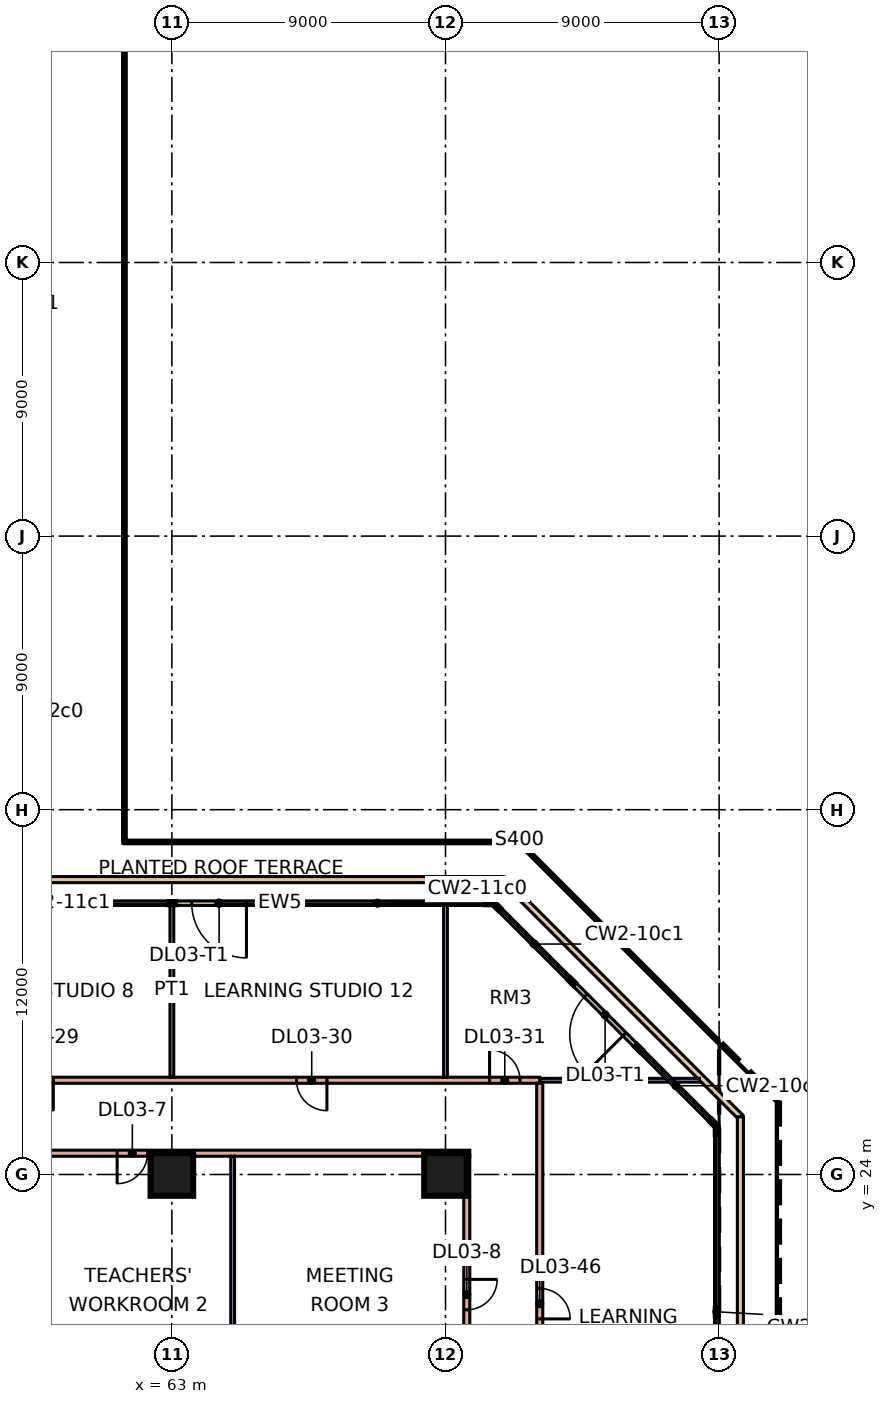
"""IFC4 building model, lengths in metres.
Left out: names, types, materials, properties, quantities, classifications, styles, units other than length and angle.
Written with IfcOpenShell. Run it as: python <this file> out.ifc"""

import sys

from ifc_helpers import new_model, si_unit, direction, frame, frame_2d, origin, origin_2d, place, context, subcontext, project, spatial, rectangle, extrude, element, fill, save


model = new_model("IFC4")
c1 = context("Model", 3, precision=1e-05, world=origin(), true_north=direction((0.0, 1.0)))
c2 = subcontext(c1, "Body", "Model", "MODEL_VIEW")
j1 = project(units=[si_unit("LENGTHUNIT", "METRE"), si_unit("PLANEANGLEUNIT", "RADIAN")], contexts=[c1])
p1 = place(None, origin())
s1 = spatial("IfcSite", under=j1, at=p1, CompositionType="ELEMENT")
p2 = place(p1, origin())
s2 = spatial("IfcBuilding", under=s1, at=p2, CompositionType="ELEMENT")
p3 = place(p2, frame((0.0, 0.0, 16.8)))
s3 = spatial("IfcBuildingStorey", under=s2, at=p3, CompositionType="ELEMENT", Elevation=16.8)
for number, where, z_axis, x_axis in (
    (1, (63.0, 24.0, 0.0), (0.0, 0.0, 1.0), (1.0, 0.0, 0.0)),
    (2, (72.0, 24.0, 0.0), (0.0, 0.0, 1.0), (1.0, 0.0, 0.0)),
):
    element("IfcColumn", number, at=place(p3, frame(where, z_axis=z_axis, x_axis=x_axis)), inside=s3, PredefinedType="COLUMN", context=c2, shape_type="SweptSolid", body=[
        extrude(rectangle(XDim=1.4, YDim=1.4, at=origin_2d()), origin(), (0.0, 0.0, 1.0), 4.8),
    ])
p4 = place(p3, frame((78.311, 28.19, 0.0), z_axis=(0.0, 0.0, 1.0), x_axis=(-0.707106781187, 0.707106781187, 0.0)))
e3 = element("IfcWall", 3, at=p4, inside=s3, PredefinedType="SOLIDWALL", context=c2, shape_type="SweptSolid", body=[
    extrude(rectangle(XDim=3.0, YDim=0.15, at=frame_2d((1.5, 0.0))), origin(), (0.0, 0.0, 1.0), 4.4),
])
p5 = place(p4, frame((0.6, 0.0, 0.0)))
e4 = element("IfcOpeningElement", 4, at=p5, cuts=e3, PredefinedType="OPENING", context=c2, shape_type="SweptSolid", body=[
    extrude(rectangle(XDim=1.8, YDim=2.4, at=frame_2d((0.9, 1.2))), frame((0.0, 0.085, 0.0), z_axis=(0.0, -1.0, 0.0), x_axis=(1.0, 0.0, 0.0)), (0.0, 0.0, 1.0), 0.17),
])
p6 = place(p3, frame((66.053, 32.925, 0.0), z_axis=(0.0, 0.0, 1.0), x_axis=(-1.0, 0.0, 0.0)))
e5 = element("IfcWall", 5, at=p6, inside=s3, PredefinedType="SOLIDWALL", context=c2, shape_type="SweptSolid", body=[
    extrude(rectangle(XDim=3.0, YDim=0.15, at=frame_2d((1.5, 0.0))), origin(), (0.0, 0.0, 1.0), 4.4),
])
p7 = place(p6, frame((0.6, 0.0, 0.0)))
e6 = element("IfcOpeningElement", 6, at=p7, cuts=e5, PredefinedType="OPENING", context=c2, shape_type="SweptSolid", body=[
    extrude(rectangle(XDim=1.8, YDim=2.4, at=frame_2d((0.9, 1.2))), frame((0.0, 0.085, 0.0), z_axis=(0.0, -1.0, 0.0), x_axis=(1.0, 0.0, 0.0)), (0.0, 0.0, 1.0), 0.17),
])
p8 = place(p3, frame((56.2, 33.7, 0.0), z_axis=(0.0, 0.0, 1.0), x_axis=(1.0, 0.0, 0.0)))
e7 = element("IfcWall", 7, at=p8, inside=s3, PredefinedType="PARAPET", context=c2, shape_type="SweptSolid", body=[
    extrude(rectangle(XDim=17.697, YDim=0.2, at=frame_2d((8.848, 0.0))), origin(), (0.0, 0.0, 1.0), 0.5),
])
p9 = place(p3, frame((73.896, 33.7, 0.0), z_axis=(0.0, 0.0, 1.0), x_axis=(0.707106781187, -0.707106781187, 0.0)))
e8 = element("IfcWall", 8, at=p9, inside=s3, PredefinedType="PARAPET", context=c2, shape_type="SweptSolid", body=[
    extrude(rectangle(XDim=11.036, YDim=0.2, at=frame_2d((5.518, 0.0))), origin(), (0.0, 0.0, 1.0), 0.5),
])
p10 = place(p3, frame((81.7, 25.896, 0.0), z_axis=(0.0, 0.0, 1.0), x_axis=(0.0, -1.0, 0.0)))
e9 = element("IfcWall", 9, at=p10, inside=s3, PredefinedType="PARAPET", context=c2, shape_type="SweptSolid", body=[
    extrude(rectangle(XDim=27.793, YDim=0.2, at=frame_2d((13.896, 0.0))), origin(), (0.0, 0.0, 1.0), 0.5),
])
p11 = place(p3, frame((38.3, 27.1, 0.0), z_axis=(0.0, 0.0, 1.0), x_axis=(1.0, 0.0, 0.0)))
e10 = element("IfcWall", 10, at=p11, inside=s3, PredefinedType="PARTITIONING", context=c2, shape_type="SweptSolid", body=[
    extrude(rectangle(XDim=36.8, YDim=0.2, at=frame_2d((18.4, 0.0))), origin(), (0.0, 0.0, 1.0), 4.4),
])
p12 = place(p11, frame((10.8, 0.0, 0.0)))
e11 = element("IfcOpeningElement", 11, at=p12, cuts=e10, PredefinedType="OPENING", context=c2, shape_type="SweptSolid", body=[
    extrude(rectangle(XDim=1.0, YDim=2.1, at=frame_2d((0.5, 1.05))), frame((0.0, 0.11, 0.0), z_axis=(0.0, -1.0, 0.0), x_axis=(1.0, 0.0, 0.0)), (0.0, 0.0, 1.0), 0.22),
])
p13 = place(p11, frame((19.8, 0.0, 0.0)))
e12 = element("IfcOpeningElement", 12, at=p13, cuts=e10, PredefinedType="OPENING", context=c2, shape_type="SweptSolid", body=[
    extrude(rectangle(XDim=1.0, YDim=2.1, at=frame_2d((0.5, 1.05))), frame((0.0, 0.11, 0.0), z_axis=(0.0, -1.0, 0.0), x_axis=(1.0, 0.0, 0.0)), (0.0, 0.0, 1.0), 0.22),
])
p14 = place(p11, frame((28.8, 0.0, 0.0)))
e13 = element("IfcOpeningElement", 13, at=p14, cuts=e10, PredefinedType="OPENING", context=c2, shape_type="SweptSolid", body=[
    extrude(rectangle(XDim=1.0, YDim=2.1, at=frame_2d((0.5, 1.05))), frame((0.0, 0.11, 0.0), z_axis=(0.0, -1.0, 0.0), x_axis=(1.0, 0.0, 0.0)), (0.0, 0.0, 1.0), 0.22),
])
p15 = place(p11, frame((35.15, 0.0, 0.0)))
e14 = element("IfcOpeningElement", 14, at=p15, cuts=e10, PredefinedType="OPENING", context=c2, shape_type="SweptSolid", body=[
    extrude(rectangle(XDim=1.0, YDim=2.1, at=frame_2d((0.5, 1.05))), frame((0.0, 0.11, 0.0), z_axis=(0.0, -1.0, 0.0), x_axis=(1.0, 0.0, 0.0)), (0.0, 0.0, 1.0), 0.22),
])
p16 = place(p3, frame((40.2, 24.7, 0.0), z_axis=(0.0, 0.0, 1.0), x_axis=(1.0, 0.0, 0.0)))
e15 = element("IfcWall", 15, at=p16, inside=s3, PredefinedType="PARTITIONING", context=c2, shape_type="SweptSolid", body=[
    extrude(rectangle(XDim=32.6, YDim=0.2, at=frame_2d((16.3, 0.0))), origin(), (0.0, 0.0, 1.0), 4.4),
])
p17 = place(p16, frame((2.65, 0.0, 0.0)))
e16 = element("IfcOpeningElement", 16, at=p17, cuts=e15, PredefinedType="OPENING", context=c2, shape_type="SweptSolid", body=[
    extrude(rectangle(XDim=1.0, YDim=2.1, at=frame_2d((0.5, 1.05))), frame((0.0, 0.11, 0.0), z_axis=(0.0, -1.0, 0.0), x_axis=(1.0, 0.0, 0.0)), (0.0, 0.0, 1.0), 0.22),
])
p18 = place(p16, frame((8.85, 0.0, 0.0)))
e17 = element("IfcOpeningElement", 17, at=p18, cuts=e15, PredefinedType="OPENING", context=c2, shape_type="SweptSolid", body=[
    extrude(rectangle(XDim=1.0, YDim=2.1, at=frame_2d((0.5, 1.05))), frame((0.0, 0.11, 0.0), z_axis=(0.0, -1.0, 0.0), x_axis=(1.0, 0.0, 0.0)), (0.0, 0.0, 1.0), 0.22),
])
p19 = place(p16, frame((15.05, 0.0, 0.0)))
e18 = element("IfcOpeningElement", 18, at=p19, cuts=e15, PredefinedType="OPENING", context=c2, shape_type="SweptSolid", body=[
    extrude(rectangle(XDim=1.0, YDim=2.1, at=frame_2d((0.5, 1.05))), frame((0.0, 0.11, 0.0), z_axis=(0.0, -1.0, 0.0), x_axis=(1.0, 0.0, 0.0)), (0.0, 0.0, 1.0), 0.22),
])
p20 = place(p16, frame((21.0, 0.0, 0.0)))
e19 = element("IfcOpeningElement", 19, at=p20, cuts=e15, PredefinedType="OPENING", context=c2, shape_type="SweptSolid", body=[
    extrude(rectangle(XDim=1.0, YDim=2.1, at=frame_2d((0.5, 1.05))), frame((0.0, 0.11, 0.0), z_axis=(0.0, -1.0, 0.0), x_axis=(1.0, 0.0, 0.0)), (0.0, 0.0, 1.0), 0.22),
])
p21 = place(p3, frame((63.0, 27.2, 0.0), z_axis=(0.0, 0.0, 1.0), x_axis=(0.0, 1.0, 0.0)))
e20 = element("IfcWall", 20, at=p21, inside=s3, PredefinedType="PARTITIONING", context=c2, shape_type="SweptSolid", body=[
    extrude(rectangle(XDim=5.725, YDim=0.125, at=frame_2d((2.863, 0.0))), origin(), (0.0, 0.0, 1.0), 4.4),
])
p22 = place(p3, frame((65.0, 15.7, 0.0), z_axis=(0.0, 0.0, 1.0), x_axis=(0.0, 1.0, 0.0)))
e21 = element("IfcWall", 21, at=p22, inside=s3, PredefinedType="PARTITIONING", context=c2, shape_type="SweptSolid", body=[
    extrude(rectangle(XDim=8.9, YDim=0.125, at=frame_2d((4.45, 0.0))), origin(), (0.0, 0.0, 1.0), 4.4),
])
p23 = place(p3, frame((72.0, 27.2, 0.0), z_axis=(0.0, 0.0, 1.0), x_axis=(0.0, 1.0, 0.0)))
e22 = element("IfcWall", 22, at=p23, inside=s3, PredefinedType="PARTITIONING", context=c2, shape_type="SweptSolid", body=[
    extrude(rectangle(XDim=6.4, YDim=0.125, at=frame_2d((3.2, 0.0))), origin(), (0.0, 0.0, 1.0), 4.4),
])
p24 = place(p3, frame((72.7, 15.7, 0.0), z_axis=(0.0, 0.0, 1.0), x_axis=(0.0, 1.0, 0.0)))
e23 = element("IfcWall", 23, at=p24, inside=s3, PredefinedType="PARTITIONING", context=c2, shape_type="SweptSolid", body=[
    extrude(rectangle(XDim=8.9, YDim=0.2, at=frame_2d((4.45, 0.0))), origin(), (0.0, 0.0, 1.0), 4.4),
])
p25 = place(p24, frame((3.85, 0.0, 0.0)))
e24 = element("IfcOpeningElement", 24, at=p25, cuts=e23, PredefinedType="OPENING", context=c2, shape_type="SweptSolid", body=[
    extrude(rectangle(XDim=1.0, YDim=2.1, at=frame_2d((0.5, 1.05))), frame((0.0, 0.11, 0.0), z_axis=(0.0, -1.0, 0.0), x_axis=(1.0, 0.0, 0.0)), (0.0, 0.0, 1.0), 0.22),
])
p26 = place(p3, frame((75.1, -3.0, 0.0), z_axis=(0.0, 0.0, 1.0), x_axis=(0.0, 1.0, 0.0)))
e25 = element("IfcWall", 25, at=p26, inside=s3, PredefinedType="PARTITIONING", context=c2, shape_type="SweptSolid", body=[
    extrude(rectangle(XDim=30.0, YDim=0.2, at=frame_2d((15.0, 0.0))), origin(), (0.0, 0.0, 1.0), 4.4),
])
p27 = place(p26, frame((8.4, 0.0, 0.0)))
e26 = element("IfcOpeningElement", 26, at=p27, cuts=e25, PredefinedType="OPENING", context=c2, shape_type="SweptSolid", body=[
    extrude(rectangle(XDim=1.0, YDim=2.1, at=frame_2d((0.5, 1.05))), frame((0.0, 0.11, 0.0), z_axis=(0.0, -1.0, 0.0), x_axis=(1.0, 0.0, 0.0)), (0.0, 0.0, 1.0), 0.22),
])
p28 = place(p26, frame((22.25, 0.0, 0.0)))
e27 = element("IfcOpeningElement", 27, at=p28, cuts=e25, PredefinedType="OPENING", context=c2, shape_type="SweptSolid", body=[
    extrude(rectangle(XDim=1.0, YDim=2.1, at=frame_2d((0.5, 1.05))), frame((0.0, 0.11, 0.0), z_axis=(0.0, -1.0, 0.0), x_axis=(1.0, 0.0, 0.0)), (0.0, 0.0, 1.0), 0.22),
])
p29 = place(p3, frame((75.1, 27.1, 0.0), z_axis=(0.0, 0.0, 1.0), x_axis=(1.0, 0.0, 0.0)))
e28 = element("IfcWall", 28, at=p29, inside=s3, PredefinedType="PARTITIONING", context=c2, shape_type="SweptSolid", body=[
    extrude(rectangle(XDim=5.255, YDim=0.125, at=frame_2d((2.627, 0.0))), origin(), (0.0, 0.0, 1.0), 4.4),
])
p30 = place(p5, origin())
e29 = element("IfcDoor", 29, at=p30, inside=s3, OperationType="DOUBLE_DOOR_SINGLE_SWING", PredefinedType="DOOR", context=c2, shape_type="SweptSolid", body=[
    extrude(rectangle(XDim=1.8, YDim=2.4, at=frame_2d((0.9, 1.2))), frame((0.0, 0.025, 0.0), z_axis=(0.0, -1.0, 0.0), x_axis=(1.0, 0.0, 0.0)), (0.0, 0.0, 1.0), 0.05),
])
fill(e4, e29)
p31 = place(p7, origin())
e30 = element("IfcDoor", 30, at=p31, inside=s3, OperationType="DOUBLE_DOOR_SINGLE_SWING", PredefinedType="DOOR", context=c2, shape_type="SweptSolid", body=[
    extrude(rectangle(XDim=1.8, YDim=2.4, at=frame_2d((0.9, 1.2))), frame((0.0, 0.025, 0.0), z_axis=(0.0, -1.0, 0.0), x_axis=(1.0, 0.0, 0.0)), (0.0, 0.0, 1.0), 0.05),
])
fill(e6, e30)
p32 = place(p20, frame((1.0, 0.0, 0.0), z_axis=(0.0, 0.0, 1.0), x_axis=(-1.0, 0.0, 0.0)))
e31 = element("IfcDoor", 31, at=p32, inside=s3, OperationType="SINGLE_SWING_LEFT", PredefinedType="DOOR", context=c2, shape_type="SweptSolid", body=[
    extrude(rectangle(XDim=1.0, YDim=2.1, at=frame_2d((0.5, 1.05))), frame((0.0, 0.025, 0.0), z_axis=(0.0, -1.0, 0.0), x_axis=(1.0, 0.0, 0.0)), (0.0, 0.0, 1.0), 0.05),
])
fill(e19, e31)
p33 = place(p25, origin())
e32 = element("IfcDoor", 32, at=p33, inside=s3, OperationType="SINGLE_SWING_RIGHT", PredefinedType="DOOR", context=c2, shape_type="SweptSolid", body=[
    extrude(rectangle(XDim=1.0, YDim=2.1, at=frame_2d((0.5, 1.05))), frame((0.0, 0.025, 0.0), z_axis=(0.0, -1.0, 0.0), x_axis=(1.0, 0.0, 0.0)), (0.0, 0.0, 1.0), 0.05),
])
fill(e24, e32)
p34 = place(p13, origin())
e33 = element("IfcDoor", 33, at=p34, inside=s3, OperationType="SINGLE_SWING_RIGHT", PredefinedType="DOOR", context=c2, shape_type="SweptSolid", body=[
    extrude(rectangle(XDim=1.0, YDim=2.1, at=frame_2d((0.5, 1.05))), frame((0.0, 0.025, 0.0), z_axis=(0.0, -1.0, 0.0), x_axis=(1.0, 0.0, 0.0)), (0.0, 0.0, 1.0), 0.05),
])
fill(e12, e33)
p35 = place(p14, origin())
e34 = element("IfcDoor", 34, at=p35, inside=s3, OperationType="SINGLE_SWING_RIGHT", PredefinedType="DOOR", context=c2, shape_type="SweptSolid", body=[
    extrude(rectangle(XDim=1.0, YDim=2.1, at=frame_2d((0.5, 1.05))), frame((0.0, 0.025, 0.0), z_axis=(0.0, -1.0, 0.0), x_axis=(1.0, 0.0, 0.0)), (0.0, 0.0, 1.0), 0.05),
])
fill(e13, e34)
p36 = place(p15, origin())
e35 = element("IfcDoor", 35, at=p36, inside=s3, OperationType="SINGLE_SWING_LEFT", PredefinedType="DOOR", context=c2, shape_type="SweptSolid", body=[
    extrude(rectangle(XDim=1.0, YDim=2.1, at=frame_2d((0.5, 1.05))), frame((0.0, 0.025, 0.0), z_axis=(0.0, -1.0, 0.0), x_axis=(1.0, 0.0, 0.0)), (0.0, 0.0, 1.0), 0.05),
])
fill(e14, e35)
p37 = place(p28, frame((1.0, 0.0, 0.0), z_axis=(0.0, 0.0, 1.0), x_axis=(-1.0, 0.0, 0.0)))
e36 = element("IfcDoor", 36, at=p37, inside=s3, OperationType="SINGLE_SWING_LEFT", PredefinedType="DOOR", context=c2, shape_type="SweptSolid", body=[
    extrude(rectangle(XDim=1.0, YDim=2.1, at=frame_2d((0.5, 1.05))), frame((0.0, 0.025, 0.0), z_axis=(0.0, -1.0, 0.0), x_axis=(1.0, 0.0, 0.0)), (0.0, 0.0, 1.0), 0.05),
])
fill(e27, e36)
save(model, sys.argv[1])
